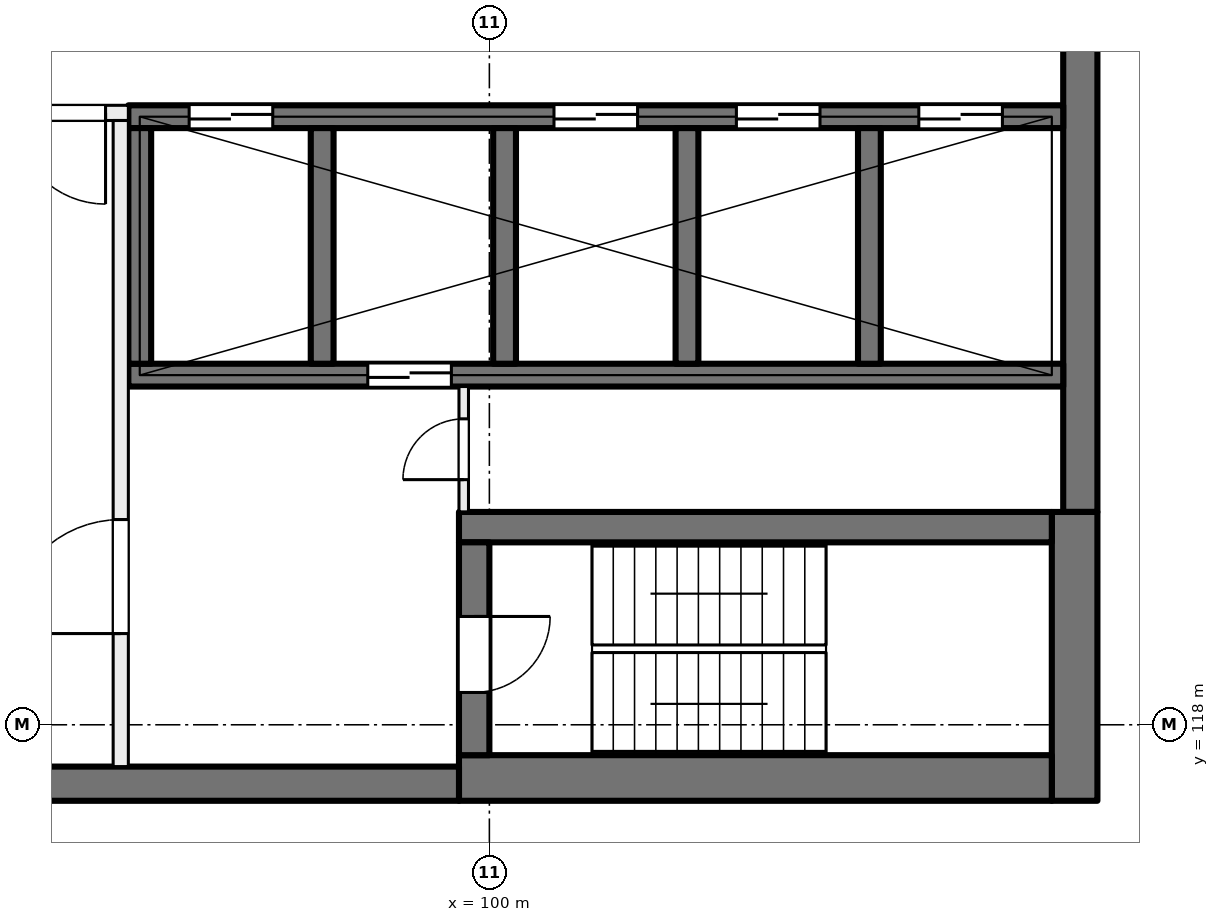
"""IFC4 building model, lengths in metres.
Left out: names, types, materials, properties, quantities, classifications, styles, units other than length and angle.
Written with IfcOpenShell. Run it as: python <this file> out.ifc"""

import sys

from ifc_helpers import new_model, si_unit, direction, frame, frame_2d, origin, place, context, subcontext, project, spatial, rectangle, extrude, element, fill, save


model = new_model("IFC4")
c1 = context("Model", 3, precision=1e-05, world=origin(), true_north=direction((0.0, 1.0)))
c2 = subcontext(c1, "Body", "Model", "MODEL_VIEW")
j1 = project(units=[si_unit("LENGTHUNIT", "METRE"), si_unit("PLANEANGLEUNIT", "RADIAN")], contexts=[c1])
p1 = place(None, origin())
s1 = spatial("IfcSite", under=j1, at=p1, CompositionType="ELEMENT")
p2 = place(p1, origin())
s2 = spatial("IfcBuilding", under=s1, at=p2, CompositionType="ELEMENT")
p3 = place(p2, frame((0.0, 0.0, 273.5)))
s3 = spatial("IfcBuildingStorey", under=s2, at=p3, CompositionType="ELEMENT", Elevation=273.5)
p4 = place(p3, frame((107.775, 135.2, 0.0), z_axis=(0.0, 0.0, 1.0), x_axis=(0.0, -1.0, 0.0)))
e1 = element("IfcWall", 1, at=p4, inside=s3, PredefinedType="SHEAR", context=c2, shape_type="SweptSolid", body=[
    extrude(rectangle(XDim=14.4, YDim=0.45, at=frame_2d((7.2, 0.0))), origin(), (0.0, 0.0, 1.0), 4.0),
])
p5 = place(p3, frame((107.7, 120.8, 0.0), z_axis=(0.0, 0.0, 1.0), x_axis=(0.0, -1.0, 0.0)))
e2 = element("IfcWall", 2, at=p5, inside=s3, PredefinedType="SHEAR", context=c2, shape_type="SweptSolid", body=[
    extrude(rectangle(XDim=3.8, YDim=0.6, at=frame_2d((1.9, 0.0))), origin(), (0.0, 0.0, 1.0), 4.0),
])
p6 = place(p3, frame((107.4, 117.3, 0.0), z_axis=(0.0, 0.0, 1.0), x_axis=(-1.0, 0.0, 0.0)))
e3 = element("IfcWall", 3, at=p6, inside=s3, PredefinedType="SHEAR", context=c2, shape_type="SweptSolid", body=[
    extrude(rectangle(XDim=7.8, YDim=0.6, at=frame_2d((3.9, 0.0))), origin(), (0.0, 0.0, 1.0), 4.0),
])
p7 = place(p3, frame((99.6, 117.225, 0.0), z_axis=(0.0, 0.0, 1.0), x_axis=(-1.0, 0.0, 0.0)))
e4 = element("IfcWall", 4, at=p7, inside=s3, PredefinedType="SHEAR", context=c2, shape_type="SweptSolid", body=[
    extrude(rectangle(XDim=9.0, YDim=0.45, at=frame_2d((4.5, 0.0))), origin(), (0.0, 0.0, 1.0), 4.0),
])
p8 = place(p3, frame((107.4, 120.6, 0.0), z_axis=(0.0, 0.0, 1.0), x_axis=(-1.0, 0.0, 0.0)))
e5 = element("IfcWall", 5, at=p8, inside=s3, PredefinedType="SHEAR", context=c2, shape_type="SweptSolid", body=[
    extrude(rectangle(XDim=7.8, YDim=0.4, at=frame_2d((3.9, 0.0))), origin(), (0.0, 0.0, 1.0), 4.0),
])
p9 = place(p3, frame((99.8, 120.4, 0.0), z_axis=(0.0, 0.0, 1.0), x_axis=(0.0, -1.0, 0.0)))
e6 = element("IfcWall", 6, at=p9, inside=s3, PredefinedType="SHEAR", context=c2, shape_type="SweptSolid", body=[
    extrude(rectangle(XDim=2.8, YDim=0.4, at=frame_2d((1.4, 0.0))), origin(), (0.0, 0.0, 1.0), 4.0),
])
p10 = place(p9, frame((0.975, 0.0, 0.0)))
e7 = element("IfcOpeningElement", 7, at=p10, cuts=e6, PredefinedType="OPENING", context=c2, shape_type="SweptSolid", body=[
    extrude(rectangle(XDim=1.0, YDim=2.1, at=frame_2d((0.5, 1.05))), frame((0.0, 0.21, 0.0), z_axis=(0.0, -1.0, 0.0), x_axis=(1.0, 0.0, 0.0)), (0.0, 0.0, 1.0), 0.42),
])
p11 = place(p3, frame((107.55, 126.0, 0.0), z_axis=(0.0, 0.0, 1.0), x_axis=(-1.0, 0.0, 0.0)))
e8 = element("IfcWall", 8, at=p11, inside=s3, PredefinedType="SHEAR", context=c2, shape_type="SweptSolid", body=[
    extrude(rectangle(XDim=12.3, YDim=0.3, at=frame_2d((6.15, 0.0))), origin(), (0.0, 0.0, 1.0), 4.0),
])
p12 = place(p11, frame((0.8, 0.0, 0.0)))
e9 = element("IfcOpeningElement", 9, at=p12, cuts=e8, PredefinedType="OPENING", context=c2, shape_type="SweptSolid", body=[
    extrude(rectangle(XDim=1.1, YDim=2.1, at=frame_2d((0.55, 1.05))), frame((0.0, 0.16, 0.0), z_axis=(0.0, -1.0, 0.0), x_axis=(1.0, 0.0, 0.0)), (0.0, 0.0, 1.0), 0.32),
])
p13 = place(p11, frame((3.2, 0.0, 0.0)))
e10 = element("IfcOpeningElement", 10, at=p13, cuts=e8, PredefinedType="OPENING", context=c2, shape_type="SweptSolid", body=[
    extrude(rectangle(XDim=1.1, YDim=2.1, at=frame_2d((0.55, 1.05))), frame((0.0, 0.16, 0.0), z_axis=(0.0, -1.0, 0.0), x_axis=(1.0, 0.0, 0.0)), (0.0, 0.0, 1.0), 0.32),
])
p14 = place(p11, frame((5.6, 0.0, 0.0)))
e11 = element("IfcOpeningElement", 11, at=p14, cuts=e8, PredefinedType="OPENING", context=c2, shape_type="SweptSolid", body=[
    extrude(rectangle(XDim=1.1, YDim=2.1, at=frame_2d((0.55, 1.05))), frame((0.0, 0.16, 0.0), z_axis=(0.0, -1.0, 0.0), x_axis=(1.0, 0.0, 0.0)), (0.0, 0.0, 1.0), 0.32),
])
p15 = place(p11, frame((10.4, 0.0, 0.0)))
e12 = element("IfcOpeningElement", 12, at=p15, cuts=e8, PredefinedType="OPENING", context=c2, shape_type="SweptSolid", body=[
    extrude(rectangle(XDim=1.1, YDim=2.1, at=frame_2d((0.55, 1.05))), frame((0.0, 0.16, 0.0), z_axis=(0.0, -1.0, 0.0), x_axis=(1.0, 0.0, 0.0)), (0.0, 0.0, 1.0), 0.32),
])
p16 = place(p3, frame((107.55, 122.6, 0.0), z_axis=(0.0, 0.0, 1.0), x_axis=(-1.0, 0.0, 0.0)))
e13 = element("IfcWall", 13, at=p16, inside=s3, PredefinedType="SHEAR", context=c2, shape_type="SweptSolid", body=[
    extrude(rectangle(XDim=12.3, YDim=0.3, at=frame_2d((6.15, 0.0))), origin(), (0.0, 0.0, 1.0), 4.0),
])
p17 = place(p16, frame((8.05, 0.0, 0.0)))
e14 = element("IfcOpeningElement", 14, at=p17, cuts=e13, PredefinedType="OPENING", context=c2, shape_type="SweptSolid", body=[
    extrude(rectangle(XDim=1.1, YDim=2.1, at=frame_2d((0.55, 1.05))), frame((0.0, 0.16, 0.0), z_axis=(0.0, -1.0, 0.0), x_axis=(1.0, 0.0, 0.0)), (0.0, 0.0, 1.0), 0.32),
])
for number, where, z_axis, x_axis in (
    (15, (105.0, 125.85, 0.0), (0.0, 0.0, 1.0), (0.0, -1.0, 0.0)),
    (16, (102.6, 125.85, 0.0), (0.0, 0.0, 1.0), (0.0, -1.0, 0.0)),
    (17, (100.2, 125.85, 0.0), (0.0, 0.0, 1.0), (0.0, -1.0, 0.0)),
    (18, (97.8, 125.85, 0.0), (0.0, 0.0, 1.0), (0.0, -1.0, 0.0)),
    (19, (95.4, 125.85, 0.0), (0.0, 0.0, 1.0), (0.0, -1.0, 0.0)),
):
    element("IfcWall", number, at=place(p3, frame(where, z_axis=z_axis, x_axis=x_axis)), inside=s3, PredefinedType="SHEAR", context=c2, shape_type="SweptSolid", body=[
        extrude(rectangle(XDim=3.1, YDim=0.3, at=frame_2d((1.55, 0.0))), origin(), (0.0, 0.0, 1.0), 4.0),
    ])
p18 = place(p3, frame((95.25, 126.05, 0.0), z_axis=(0.0, 0.0, 1.0), x_axis=(-1.0, 0.0, 0.0)))
e20 = element("IfcWall", 20, at=p18, inside=s3, PredefinedType="PARTITIONING", context=c2, shape_type="SweptSolid", body=[
    extrude(rectangle(XDim=3.95, YDim=0.2, at=frame_2d((1.975, 0.0))), origin(), (0.0, 0.0, 1.0), 3.625),
])
p19 = place(p18, frame((0.3, 0.0, 0.0)))
e21 = element("IfcOpeningElement", 21, at=p19, cuts=e20, PredefinedType="OPENING", context=c2, shape_type="SweptSolid", body=[
    extrude(rectangle(XDim=1.2, YDim=2.1, at=frame_2d((0.6, 1.05))), frame((0.0, 0.11, 0.0), z_axis=(0.0, -1.0, 0.0), x_axis=(1.0, 0.0, 0.0)), (0.0, 0.0, 1.0), 0.22),
])
p20 = place(p3, frame((95.15, 117.45, 0.0), z_axis=(0.0, 0.0, 1.0), x_axis=(0.0, 1.0, 0.0)))
e22 = element("IfcWall", 22, at=p20, inside=s3, PredefinedType="PARTITIONING", context=c2, shape_type="SweptSolid", body=[
    extrude(rectangle(XDim=8.5, YDim=0.2, at=frame_2d((4.25, 0.0))), origin(), (0.0, 0.0, 1.0), 3.625),
])
p21 = place(p20, frame((1.75, 0.0, 0.0)))
e23 = element("IfcOpeningElement", 23, at=p21, cuts=e22, PredefinedType="OPENING", context=c2, shape_type="SweptSolid", body=[
    extrude(rectangle(XDim=1.5, YDim=2.1, at=frame_2d((0.75, 1.05))), frame((0.0, 0.11, 0.0), z_axis=(0.0, -1.0, 0.0), x_axis=(1.0, 0.0, 0.0)), (0.0, 0.0, 1.0), 0.22),
])
p22 = place(p3, frame((99.663, 120.8, 0.0), z_axis=(0.0, 0.0, 1.0), x_axis=(0.0, 1.0, 0.0)))
e24 = element("IfcWall", 24, at=p22, inside=s3, PredefinedType="PARTITIONING", context=c2, shape_type="SweptSolid", body=[
    extrude(rectangle(XDim=1.65, YDim=0.125, at=frame_2d((0.825, 0.0))), origin(), (0.0, 0.0, 1.0), 3.625),
])
p23 = place(p22, frame((0.425, 0.0, 0.0)))
e25 = element("IfcOpeningElement", 25, at=p23, cuts=e24, PredefinedType="OPENING", context=c2, shape_type="SweptSolid", body=[
    extrude(rectangle(XDim=0.8, YDim=2.1, at=frame_2d((0.4, 1.05))), frame((0.0, 0.073, 0.0), z_axis=(0.0, -1.0, 0.0), x_axis=(1.0, 0.0, 0.0)), (0.0, 0.0, 1.0), 0.145),
])
p24 = place(p12, origin())
e26 = element("IfcDoor", 26, at=p24, inside=s3, OperationType="DOUBLE_DOOR_SLIDING", PredefinedType="DOOR", context=c2, shape_type="SweptSolid", body=[
    extrude(rectangle(XDim=1.1, YDim=2.1, at=frame_2d((0.55, 1.05))), frame((0.0, 0.025, 0.0), z_axis=(0.0, -1.0, 0.0), x_axis=(1.0, 0.0, 0.0)), (0.0, 0.0, 1.0), 0.05),
])
fill(e9, e26)
p25 = place(p13, origin())
e27 = element("IfcDoor", 27, at=p25, inside=s3, OperationType="DOUBLE_DOOR_SLIDING", PredefinedType="DOOR", context=c2, shape_type="SweptSolid", body=[
    extrude(rectangle(XDim=1.1, YDim=2.1, at=frame_2d((0.55, 1.05))), frame((0.0, 0.025, 0.0), z_axis=(0.0, -1.0, 0.0), x_axis=(1.0, 0.0, 0.0)), (0.0, 0.0, 1.0), 0.05),
])
fill(e10, e27)
p26 = place(p14, origin())
e28 = element("IfcDoor", 28, at=p26, inside=s3, OperationType="DOUBLE_DOOR_SLIDING", PredefinedType="DOOR", context=c2, shape_type="SweptSolid", body=[
    extrude(rectangle(XDim=1.1, YDim=2.1, at=frame_2d((0.55, 1.05))), frame((0.0, 0.025, 0.0), z_axis=(0.0, -1.0, 0.0), x_axis=(1.0, 0.0, 0.0)), (0.0, 0.0, 1.0), 0.05),
])
fill(e11, e28)
p27 = place(p15, origin())
e29 = element("IfcDoor", 29, at=p27, inside=s3, OperationType="DOUBLE_DOOR_SLIDING", PredefinedType="DOOR", context=c2, shape_type="SweptSolid", body=[
    extrude(rectangle(XDim=1.1, YDim=2.1, at=frame_2d((0.55, 1.05))), frame((0.0, 0.025, 0.0), z_axis=(0.0, -1.0, 0.0), x_axis=(1.0, 0.0, 0.0)), (0.0, 0.0, 1.0), 0.05),
])
fill(e12, e29)
p28 = place(p19, origin())
e30 = element("IfcDoor", 30, at=p28, inside=s3, OperationType="DOUBLE_DOOR_SINGLE_SWING", PredefinedType="DOOR", context=c2, shape_type="SweptSolid", body=[
    extrude(rectangle(XDim=1.2, YDim=2.1, at=frame_2d((0.6, 1.05))), frame((0.0, 0.025, 0.0), z_axis=(0.0, -1.0, 0.0), x_axis=(1.0, 0.0, 0.0)), (0.0, 0.0, 1.0), 0.05),
])
fill(e21, e30)
p29 = place(p21, origin())
e31 = element("IfcDoor", 31, at=p29, inside=s3, OperationType="DOUBLE_DOOR_SINGLE_SWING", PredefinedType="DOOR", context=c2, shape_type="SweptSolid", body=[
    extrude(rectangle(XDim=1.5, YDim=2.1, at=frame_2d((0.75, 1.05))), frame((0.0, 0.025, 0.0), z_axis=(0.0, -1.0, 0.0), x_axis=(1.0, 0.0, 0.0)), (0.0, 0.0, 1.0), 0.05),
])
fill(e23, e31)
p30 = place(p10, origin())
e32 = element("IfcDoor", 32, at=p30, inside=s3, OperationType="SINGLE_SWING_LEFT", PredefinedType="DOOR", context=c2, shape_type="SweptSolid", body=[
    extrude(rectangle(XDim=1.0, YDim=2.1, at=frame_2d((0.5, 1.05))), frame((0.0, 0.025, 0.0), z_axis=(0.0, -1.0, 0.0), x_axis=(1.0, 0.0, 0.0)), (0.0, 0.0, 1.0), 0.05),
])
fill(e7, e32)
p31 = place(p23, origin())
e33 = element("IfcDoor", 33, at=p31, inside=s3, OperationType="SINGLE_SWING_RIGHT", PredefinedType="DOOR", context=c2, shape_type="SweptSolid", body=[
    extrude(rectangle(XDim=0.8, YDim=2.1, at=frame_2d((0.4, 1.05))), frame((0.0, 0.025, 0.0), z_axis=(0.0, -1.0, 0.0), x_axis=(1.0, 0.0, 0.0)), (0.0, 0.0, 1.0), 0.05),
])
fill(e25, e33)
p32 = place(p17, origin())
e34 = element("IfcDoor", 34, at=p32, inside=s3, OperationType="DOUBLE_DOOR_SLIDING", PredefinedType="DOOR", context=c2, shape_type="SweptSolid", body=[
    extrude(rectangle(XDim=1.1, YDim=2.1, at=frame_2d((0.55, 1.05))), frame((0.0, 0.025, 0.0), z_axis=(0.0, -1.0, 0.0), x_axis=(1.0, 0.0, 0.0)), (0.0, 0.0, 1.0), 0.05),
])
fill(e14, e34)
save(model, sys.argv[1])
